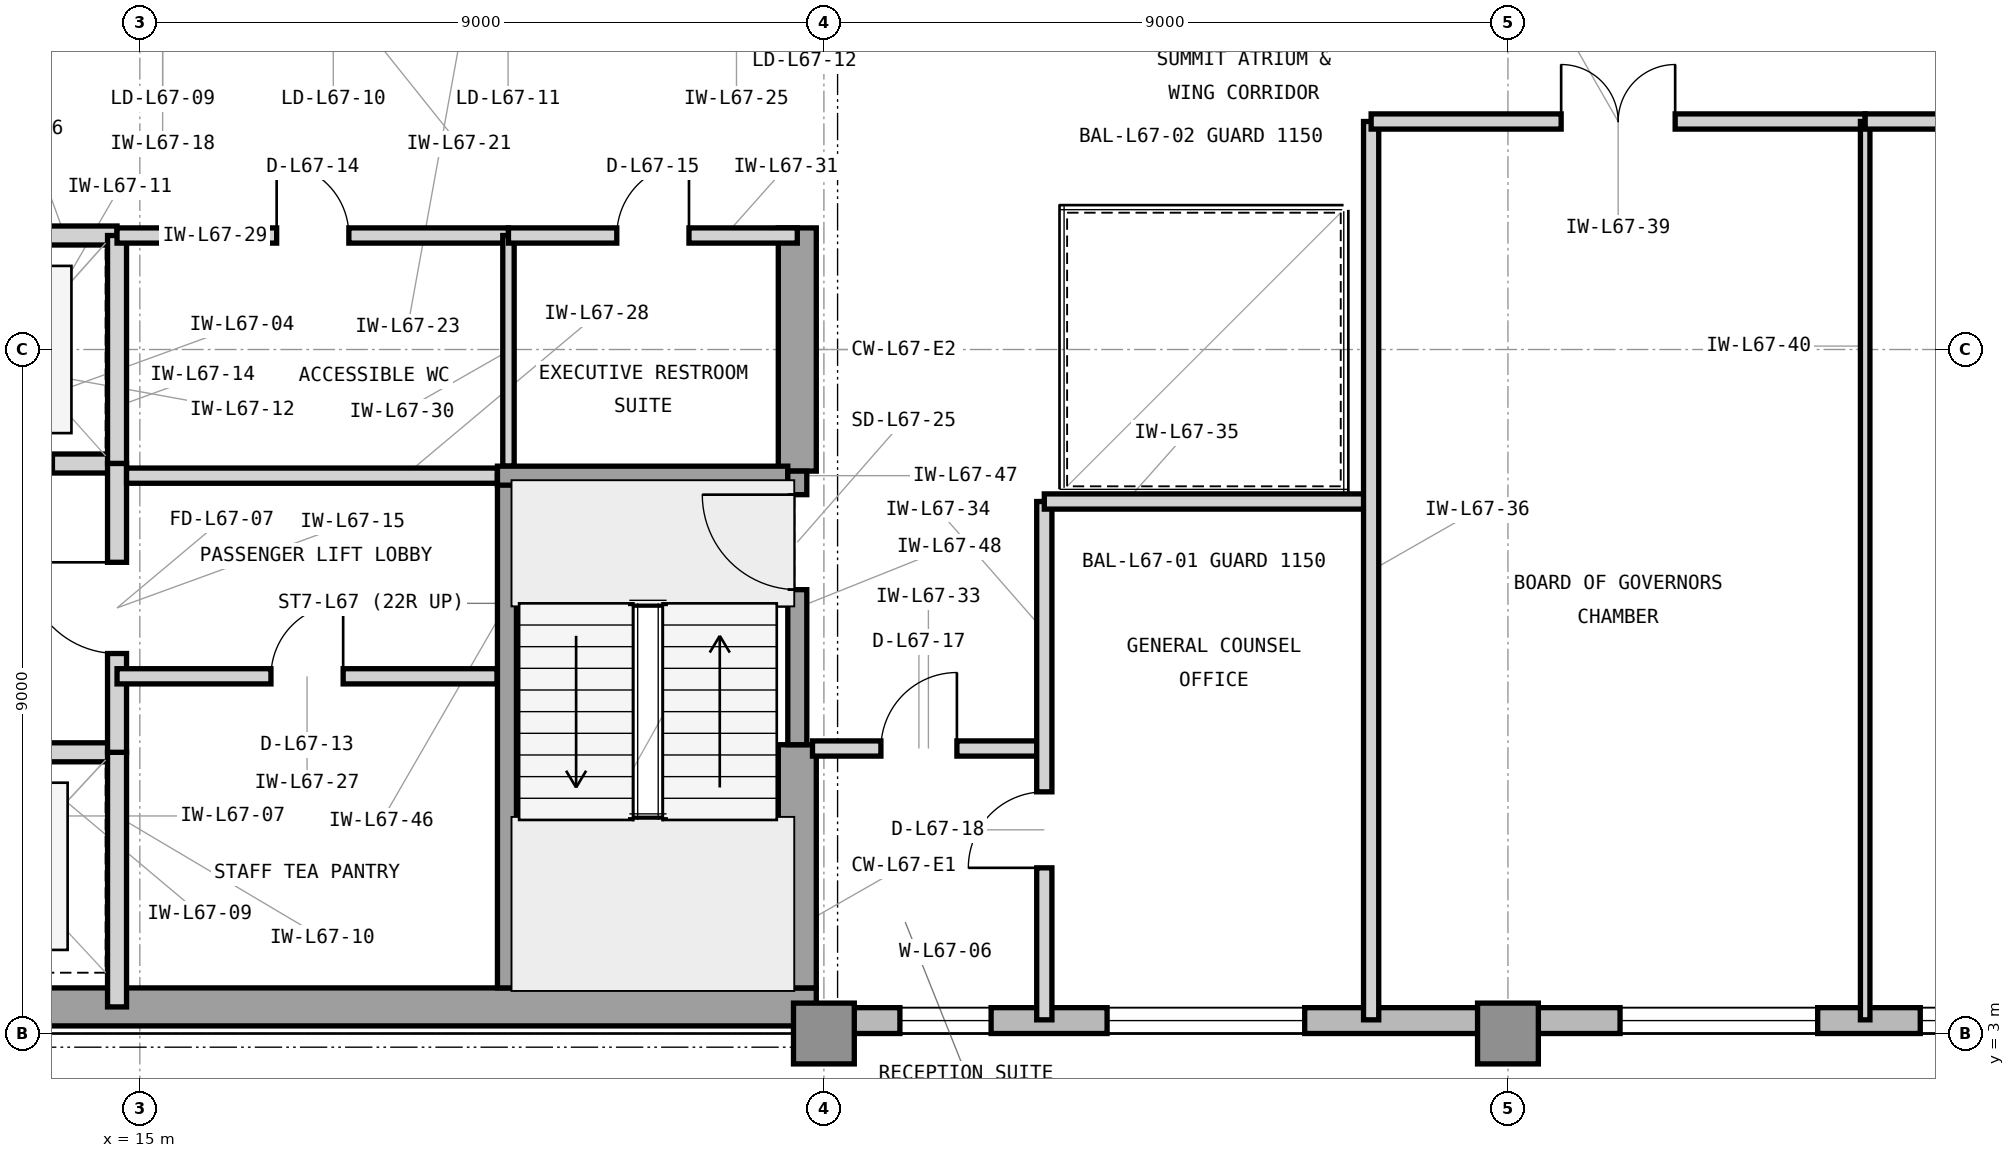
"""IFC4 building model, lengths in metres.
Left out: names, types, materials, properties, quantities, classifications, styles, units other than length and angle.
Written with IfcOpenShell. Run it as: python <this file> out.ifc"""

import sys

from ifc_helpers import new_model, si_unit, direction, frame, frame_2d, origin, origin_2d, place, context, subcontext, project, spatial, rectangle, extrude, element, fill, save


model = new_model("IFC4")
c1 = context("Model", 3, precision=1e-05, world=origin(), true_north=direction((0.0, 1.0)))
c2 = subcontext(c1, "Body", "Model", "MODEL_VIEW")
j1 = project(units=[si_unit("LENGTHUNIT", "METRE"), si_unit("PLANEANGLEUNIT", "RADIAN")], contexts=[c1])
p1 = place(None, origin())
s1 = spatial("IfcSite", under=j1, at=p1, CompositionType="ELEMENT")
p2 = place(p1, origin())
s2 = spatial("IfcBuilding", under=s1, at=p2, CompositionType="ELEMENT")
p3 = place(p2, frame((0.0, 0.0, 274.2)))
s3 = spatial("IfcBuildingStorey", under=s2, at=p3, CompositionType="ELEMENT", Elevation=274.2)
p4 = place(p3, frame((7.475, 3.35, 0.0), z_axis=(0.0, 0.0, 1.0), x_axis=(1.0, 0.0, 0.0)))
e1 = element("IfcWall", 1, at=p4, inside=s3, PredefinedType="SHEAR", context=c2, shape_type="SweptSolid", body=[
    extrude(rectangle(XDim=16.425, YDim=0.5, at=frame_2d((8.212, 0.0))), origin(), (0.0, 0.0, 1.0), 3.9),
])
p5 = place(p3, frame((23.65, 3.6, 0.0), z_axis=(0.0, 0.0, 1.0), x_axis=(0.0, 1.0, 0.0)))
e2 = element("IfcWall", 2, at=p5, inside=s3, PredefinedType="SHEAR", context=c2, shape_type="SweptSolid", body=[
    extrude(rectangle(XDim=3.2, YDim=0.5, at=frame_2d((1.6, 0.0))), origin(), (0.0, 0.0, 1.0), 3.9),
])
p6 = place(p3, frame((23.65, 10.4, 0.0), z_axis=(0.0, 0.0, 1.0), x_axis=(0.0, 1.0, 0.0)))
e3 = element("IfcWall", 3, at=p6, inside=s3, PredefinedType="SHEAR", context=c2, shape_type="SweptSolid", body=[
    extrude(rectangle(XDim=3.2, YDim=0.5, at=frame_2d((1.6, 0.0))), origin(), (0.0, 0.0, 1.0), 3.9),
])
for number, where, z_axis, x_axis in (
    (4, (24.0, 3.0, 0.0), (0.0, 0.0, 1.0), (1.0, 0.0, 0.0)),
    (5, (33.0, 3.0, 0.0), (0.0, 0.0, 1.0), (1.0, 0.0, 0.0)),
):
    element("IfcColumn", number, at=place(p3, frame(where, z_axis=z_axis, x_axis=x_axis)), inside=s3, PredefinedType="COLUMN", context=c2, shape_type="SweptSolid", body=[
        extrude(rectangle(XDim=0.8, YDim=0.8, at=origin_2d()), origin(), (0.0, 0.0, 1.0), 3.9),
    ])
p7 = place(p3, frame((23.9, 3.17, 0.0), z_axis=(0.0, 0.0, 1.0), x_axis=(1.0, 0.0, 0.0)))
e6 = element("IfcWall", 6, at=p7, inside=s3, PredefinedType="STANDARD", context=c2, shape_type="SweptSolid", body=[
    extrude(rectangle(XDim=28.5, YDim=0.34, at=frame_2d((14.25, 0.0))), origin(), (0.0, 0.0, 1.0), 3.715),
])
p8 = place(p7, frame((10.575, 0.0, 0.8)))
e7 = element("IfcOpeningElement", 7, at=p8, cuts=e6, PredefinedType="OPENING", context=c2, shape_type="SweptSolid", body=[
    extrude(rectangle(XDim=2.6, YDim=2.35, at=frame_2d((1.3, 1.175))), frame((0.0, 0.18, 0.0), z_axis=(0.0, -1.0, 0.0), x_axis=(1.0, 0.0, 0.0)), (0.0, 0.0, 1.0), 0.36),
])
p9 = place(p7, frame((1.1, 0.0, 0.8)))
e8 = element("IfcOpeningElement", 8, at=p9, cuts=e6, PredefinedType="OPENING", context=c2, shape_type="SweptSolid", body=[
    extrude(rectangle(XDim=1.2, YDim=2.35, at=frame_2d((0.6, 1.175))), frame((0.0, 0.18, 0.0), z_axis=(0.0, -1.0, 0.0), x_axis=(1.0, 0.0, 0.0)), (0.0, 0.0, 1.0), 0.36),
])
p10 = place(p7, frame((3.826, 0.0, 0.8)))
e9 = element("IfcOpeningElement", 9, at=p10, cuts=e6, PredefinedType="OPENING", context=c2, shape_type="SweptSolid", body=[
    extrude(rectangle(XDim=2.6, YDim=2.35, at=frame_2d((1.3, 1.175))), frame((0.0, 0.18, 0.0), z_axis=(0.0, -1.0, 0.0), x_axis=(1.0, 0.0, 0.0)), (0.0, 0.0, 1.0), 0.36),
])
p11 = place(p7, frame((14.525, 0.0, 0.8)))
e10 = element("IfcOpeningElement", 10, at=p11, cuts=e6, PredefinedType="OPENING", context=c2, shape_type="SweptSolid", body=[
    extrude(rectangle(XDim=2.6, YDim=2.35, at=frame_2d((1.3, 1.175))), frame((0.0, 0.18, 0.0), z_axis=(0.0, -1.0, 0.0), x_axis=(1.0, 0.0, 0.0)), (0.0, 0.0, 1.0), 0.36),
])
p12 = place(p3, frame((11.82, 6.7, 0.0), z_axis=(0.0, 0.0, 1.0), x_axis=(1.0, 0.0, 0.0)))
e11 = element("IfcWall", 11, at=p12, inside=s3, PredefinedType="PARTITIONING", context=c2, shape_type="SweptSolid", body=[
    extrude(rectangle(XDim=2.88, YDim=0.25, at=frame_2d((1.44, 0.0))), origin(), (0.0, 0.0, 1.0), 3.088),
])
p13 = place(p12, frame((0.85, 0.0, 0.0)))
e12 = element("IfcOpeningElement", 12, at=p13, cuts=e11, PredefinedType="OPENING", context=c2, shape_type="SweptSolid", body=[
    extrude(rectangle(XDim=1.1, YDim=2.25, at=frame_2d((0.55, 1.125))), frame((0.0, 0.135, 0.0), z_axis=(0.0, -1.0, 0.0), x_axis=(1.0, 0.0, 0.0)), (0.0, 0.0, 1.0), 0.27),
])
p14 = place(p3, frame((14.7, 3.35, 0.0), z_axis=(0.0, 0.0, 1.0), x_axis=(0.0, 1.0, 0.0)))
e13 = element("IfcWall", 13, at=p14, inside=s3, PredefinedType="PARTITIONING", context=c2, shape_type="SweptSolid", body=[
    extrude(rectangle(XDim=3.35, YDim=0.25, at=frame_2d((1.675, 0.0))), origin(), (0.0, 0.0, 1.0), 3.705),
])
p15 = place(p3, frame((11.95, 10.5, 0.0), z_axis=(0.0, 0.0, 1.0), x_axis=(1.0, 0.0, 0.0)))
e14 = element("IfcWall", 14, at=p15, inside=s3, PredefinedType="PARTITIONING", context=c2, shape_type="SweptSolid", body=[
    extrude(rectangle(XDim=2.75, YDim=0.25, at=frame_2d((1.375, 0.0))), origin(), (0.0, 0.0, 1.0), 3.088),
])
p16 = place(p15, frame((0.8, 0.0, 0.0)))
e15 = element("IfcOpeningElement", 15, at=p16, cuts=e14, PredefinedType="OPENING", context=c2, shape_type="SweptSolid", body=[
    extrude(rectangle(XDim=1.1, YDim=2.25, at=frame_2d((0.55, 1.125))), frame((0.0, 0.135, 0.0), z_axis=(0.0, -1.0, 0.0), x_axis=(1.0, 0.0, 0.0)), (0.0, 0.0, 1.0), 0.27),
])
p17 = place(p3, frame((11.95, 13.5, 0.0), z_axis=(0.0, 0.0, 1.0), x_axis=(1.0, 0.0, 0.0)))
e16 = element("IfcWall", 16, at=p17, inside=s3, PredefinedType="PARTITIONING", context=c2, shape_type="SweptSolid", body=[
    extrude(rectangle(XDim=2.75, YDim=0.25, at=frame_2d((1.375, 0.0))), origin(), (0.0, 0.0, 1.0), 3.088),
])
p18 = place(p3, frame((14.7, 10.5, 0.0), z_axis=(0.0, 0.0, 1.0), x_axis=(0.0, 1.0, 0.0)))
e17 = element("IfcWall", 17, at=p18, inside=s3, PredefinedType="PARTITIONING", context=c2, shape_type="SweptSolid", body=[
    extrude(rectangle(XDim=3.0, YDim=0.25, at=frame_2d((1.5, 0.0))), origin(), (0.0, 0.0, 1.0), 3.705),
])
p19 = place(p3, frame((14.7, 6.7, 0.0), z_axis=(0.0, 0.0, 1.0), x_axis=(0.0, 1.0, 0.0)))
e18 = element("IfcWall", 18, at=p19, inside=s3, PredefinedType="PARTITIONING", context=c2, shape_type="SweptSolid", body=[
    extrude(rectangle(XDim=3.8, YDim=0.25, at=frame_2d((1.9, 0.0))), origin(), (0.0, 0.0, 1.0), 3.705),
])
p20 = place(p19, frame((1.3, 0.0, 0.0)))
e19 = element("IfcOpeningElement", 19, at=p20, cuts=e18, PredefinedType="OPENING", context=c2, shape_type="SweptSolid", body=[
    extrude(rectangle(XDim=1.2, YDim=2.2, at=frame_2d((0.6, 1.1))), frame((0.0, 0.135, 0.0), z_axis=(0.0, -1.0, 0.0), x_axis=(1.0, 0.0, 0.0)), (0.0, 0.0, 1.0), 0.27),
])
p21 = place(p3, frame((14.7, 7.7, 0.0), z_axis=(0.0, 0.0, 1.0), x_axis=(1.0, 0.0, 0.0)))
e20 = element("IfcWall", 20, at=p21, inside=s3, PredefinedType="PARTITIONING", context=c2, shape_type="SweptSolid", body=[
    extrude(rectangle(XDim=5.0, YDim=0.2, at=frame_2d((2.5, 0.0))), origin(), (0.0, 0.0, 1.0), 3.705),
])
p22 = place(p21, frame((2.025, 0.0, 0.0)))
e21 = element("IfcOpeningElement", 21, at=p22, cuts=e20, PredefinedType="OPENING", context=c2, shape_type="SweptSolid", body=[
    extrude(rectangle(XDim=0.95, YDim=2.1, at=frame_2d((0.475, 1.05))), frame((0.0, 0.11, 0.0), z_axis=(0.0, -1.0, 0.0), x_axis=(1.0, 0.0, 0.0)), (0.0, 0.0, 1.0), 0.22),
])
p23 = place(p3, frame((14.825, 10.34, 0.0), z_axis=(0.0, 0.0, 1.0), x_axis=(1.0, 0.0, 0.0)))
e22 = element("IfcWall", 22, at=p23, inside=s3, PredefinedType="PARTITIONING", context=c2, shape_type="SweptSolid", body=[
    extrude(rectangle(XDim=4.88, YDim=0.2, at=frame_2d((2.44, 0.0))), origin(), (0.0, 0.0, 1.0), 3.088),
])
p24 = place(p3, frame((14.7, 13.5, 0.0), z_axis=(0.0, 0.0, 1.0), x_axis=(1.0, 0.0, 0.0)))
e23 = element("IfcWall", 23, at=p24, inside=s3, PredefinedType="PARTITIONING", context=c2, shape_type="SweptSolid", body=[
    extrude(rectangle(XDim=5.15, YDim=0.2, at=frame_2d((2.575, 0.0))), origin(), (0.0, 0.0, 1.0), 3.088),
])
p25 = place(p24, frame((2.1, 0.0, 0.0)))
e24 = element("IfcOpeningElement", 24, at=p25, cuts=e23, PredefinedType="OPENING", context=c2, shape_type="SweptSolid", body=[
    extrude(rectangle(XDim=0.95, YDim=2.1, at=frame_2d((0.475, 1.05))), frame((0.0, 0.11, 0.0), z_axis=(0.0, -1.0, 0.0), x_axis=(1.0, 0.0, 0.0)), (0.0, 0.0, 1.0), 0.22),
])
p26 = place(p3, frame((19.85, 10.465, 0.0), z_axis=(0.0, 0.0, 1.0), x_axis=(0.0, 1.0, 0.0)))
e25 = element("IfcWall", 25, at=p26, inside=s3, PredefinedType="PARTITIONING", context=c2, shape_type="SweptSolid", body=[
    extrude(rectangle(XDim=3.035, YDim=0.15, at=frame_2d((1.518, 0.0))), origin(), (0.0, 0.0, 1.0), 3.705),
])
p27 = place(p3, frame((19.85, 13.5, 0.0), z_axis=(0.0, 0.0, 1.0), x_axis=(1.0, 0.0, 0.0)))
e26 = element("IfcWall", 26, at=p27, inside=s3, PredefinedType="PARTITIONING", context=c2, shape_type="SweptSolid", body=[
    extrude(rectangle(XDim=3.8, YDim=0.2, at=frame_2d((1.9, 0.0))), origin(), (0.0, 0.0, 1.0), 3.088),
])
p28 = place(p27, frame((1.425, 0.0, 0.0)))
e27 = element("IfcOpeningElement", 27, at=p28, cuts=e26, PredefinedType="OPENING", context=c2, shape_type="SweptSolid", body=[
    extrude(rectangle(XDim=0.95, YDim=2.1, at=frame_2d((0.475, 1.05))), frame((0.0, 0.11, 0.0), z_axis=(0.0, -1.0, 0.0), x_axis=(1.0, 0.0, 0.0)), (0.0, 0.0, 1.0), 0.22),
])
p29 = place(p3, frame((23.85, 6.75, 0.0), z_axis=(0.0, 0.0, 1.0), x_axis=(1.0, 0.0, 0.0)))
e28 = element("IfcWall", 28, at=p29, inside=s3, PredefinedType="PARTITIONING", context=c2, shape_type="SweptSolid", body=[
    extrude(rectangle(XDim=3.05, YDim=0.2, at=frame_2d((1.525, 0.0))), origin(), (0.0, 0.0, 1.0), 3.705),
])
p30 = place(p29, frame((0.9, 0.0, 0.0)))
e29 = element("IfcOpeningElement", 29, at=p30, cuts=e28, PredefinedType="OPENING", context=c2, shape_type="SweptSolid", body=[
    extrude(rectangle(XDim=1.0, YDim=2.15, at=frame_2d((0.5, 1.075))), frame((0.0, 0.11, 0.0), z_axis=(0.0, -1.0, 0.0), x_axis=(1.0, 0.0, 0.0)), (0.0, 0.0, 1.0), 0.22),
])
p31 = place(p3, frame((26.9, 3.18, 0.0), z_axis=(0.0, 0.0, 1.0), x_axis=(0.0, 1.0, 0.0)))
e30 = element("IfcWall", 30, at=p31, inside=s3, PredefinedType="PARTITIONING", context=c2, shape_type="SweptSolid", body=[
    extrude(rectangle(XDim=6.82, YDim=0.2, at=frame_2d((3.41, 0.0))), origin(), (0.0, 0.0, 1.0), 3.705),
])
p32 = place(p31, frame((2.0, 0.0, 0.0)))
e31 = element("IfcOpeningElement", 31, at=p32, cuts=e30, PredefinedType="OPENING", context=c2, shape_type="SweptSolid", body=[
    extrude(rectangle(XDim=1.0, YDim=2.15, at=frame_2d((0.5, 1.075))), frame((0.0, 0.11, 0.0), z_axis=(0.0, -1.0, 0.0), x_axis=(1.0, 0.0, 0.0)), (0.0, 0.0, 1.0), 0.22),
])
p33 = place(p3, frame((26.9, 10.0, 0.0), z_axis=(0.0, 0.0, 1.0), x_axis=(1.0, 0.0, 0.0)))
e32 = element("IfcWall", 32, at=p33, inside=s3, PredefinedType="PARTITIONING", context=c2, shape_type="SweptSolid", body=[
    extrude(rectangle(XDim=4.3, YDim=0.2, at=frame_2d((2.15, 0.0))), origin(), (0.0, 0.0, 1.0), 3.705),
])
p34 = place(p3, frame((31.2, 3.18, 0.0), z_axis=(0.0, 0.0, 1.0), x_axis=(0.0, 1.0, 0.0)))
e33 = element("IfcWall", 33, at=p34, inside=s3, PredefinedType="PARTITIONING", context=c2, shape_type="SweptSolid", body=[
    extrude(rectangle(XDim=11.82, YDim=0.2, at=frame_2d((5.91, 0.0))), origin(), (0.0, 0.0, 1.0), 3.705),
])
p35 = place(p3, frame((31.2, 15.0, 0.0), z_axis=(0.0, 0.0, 1.0), x_axis=(1.0, 0.0, 0.0)))
e34 = element("IfcWall", 34, at=p35, inside=s3, PredefinedType="PARTITIONING", context=c2, shape_type="SweptSolid", body=[
    extrude(rectangle(XDim=6.5, YDim=0.2, at=frame_2d((3.25, 0.0))), origin(), (0.0, 0.0, 1.0), 3.301),
])
p36 = place(p35, frame((2.5, 0.0, 0.0)))
e35 = element("IfcOpeningElement", 35, at=p36, cuts=e34, PredefinedType="OPENING", context=c2, shape_type="SweptSolid", body=[
    extrude(rectangle(XDim=1.5, YDim=2.3, at=frame_2d((0.75, 1.15))), frame((0.0, 0.11, 0.0), z_axis=(0.0, -1.0, 0.0), x_axis=(1.0, 0.0, 0.0)), (0.0, 0.0, 1.0), 0.22),
])
p37 = place(p3, frame((37.7, 3.18, 0.0), z_axis=(0.0, 0.0, 1.0), x_axis=(0.0, 1.0, 0.0)))
e36 = element("IfcWall", 36, at=p37, inside=s3, PredefinedType="PARTITIONING", context=c2, shape_type="SweptSolid", body=[
    extrude(rectangle(XDim=11.82, YDim=0.125, at=frame_2d((5.91, 0.0))), origin(), (0.0, 0.0, 1.0), 3.705),
])
p38 = place(p3, frame((37.7, 15.0, 0.0), z_axis=(0.0, 0.0, 1.0), x_axis=(1.0, 0.0, 0.0)))
e37 = element("IfcWall", 37, at=p38, inside=s3, PredefinedType="PARTITIONING", context=c2, shape_type="SweptSolid", body=[
    extrude(rectangle(XDim=7.8, YDim=0.2, at=frame_2d((3.9, 0.0))), origin(), (0.0, 0.0, 1.0), 3.301),
])
p39 = place(p38, frame((3.4, 0.0, 0.0)))
e38 = element("IfcOpeningElement", 38, at=p39, cuts=e37, PredefinedType="OPENING", context=c2, shape_type="SweptSolid", body=[
    extrude(rectangle(XDim=1.0, YDim=2.15, at=frame_2d((0.5, 1.075))), frame((0.0, 0.11, 0.0), z_axis=(0.0, -1.0, 0.0), x_axis=(1.0, 0.0, 0.0)), (0.0, 0.0, 1.0), 0.22),
])
p40 = place(p3, frame((19.83, 3.6, 0.0), z_axis=(0.0, 0.0, 1.0), x_axis=(0.0, 1.0, 0.0)))
e39 = element("IfcWall", 39, at=p40, inside=s3, PredefinedType="SHEAR", context=c2, shape_type="SweptSolid", body=[
    extrude(rectangle(XDim=6.74, YDim=0.25, at=frame_2d((3.37, 0.0))), origin(), (0.0, 0.0, 1.0), 3.9),
])
p41 = place(p3, frame((19.705, 10.34, 0.0), z_axis=(0.0, 0.0, 1.0), x_axis=(1.0, 0.0, 0.0)))
e40 = element("IfcWall", 40, at=p41, inside=s3, PredefinedType="SHEAR", context=c2, shape_type="SweptSolid", body=[
    extrude(rectangle(XDim=3.82, YDim=0.25, at=frame_2d((1.91, 0.0))), origin(), (0.0, 0.0, 1.0), 3.9),
])
p42 = place(p3, frame((23.65, 6.8, 0.0), z_axis=(0.0, 0.0, 1.0), x_axis=(0.0, 1.0, 0.0)))
e41 = element("IfcWall", 41, at=p42, inside=s3, PredefinedType="SHEAR", context=c2, shape_type="SweptSolid", body=[
    extrude(rectangle(XDim=3.6, YDim=0.25, at=frame_2d((1.8, 0.0))), origin(), (0.0, 0.0, 1.0), 3.9),
])
p43 = place(p42, frame((2.04, 0.0, 0.0)))
e42 = element("IfcOpeningElement", 42, at=p43, cuts=e41, PredefinedType="OPENING", context=c2, shape_type="SweptSolid", body=[
    extrude(rectangle(XDim=1.25, YDim=2.2, at=frame_2d((0.625, 1.1))), frame((0.0, 0.135, 0.0), z_axis=(0.0, -1.0, 0.0), x_axis=(1.0, 0.0, 0.0)), (0.0, 0.0, 1.0), 0.27),
])
p44 = place(p8, origin())
e43 = element("IfcWindow", 43, at=p44, inside=s3, PartitioningType="SINGLE_PANEL", PredefinedType="WINDOW", context=c2, shape_type="SweptSolid", body=[
    extrude(rectangle(XDim=2.6, YDim=2.35, at=frame_2d((1.3, 1.175))), frame((0.0, 0.11, 0.0), z_axis=(0.0, -1.0, 0.0), x_axis=(1.0, 0.0, 0.0)), (0.0, 0.0, 1.0), 0.06),
])
fill(e7, e43)
p45 = place(p20, origin())
e44 = element("IfcDoor", 44, at=p45, inside=s3, OperationType="SINGLE_SWING_RIGHT", PredefinedType="DOOR", context=c2, shape_type="SweptSolid", body=[
    extrude(rectangle(XDim=1.2, YDim=2.2, at=frame_2d((0.6, 1.1))), frame((0.0, 0.025, 0.0), z_axis=(0.0, -1.0, 0.0), x_axis=(1.0, 0.0, 0.0)), (0.0, 0.0, 1.0), 0.05),
])
fill(e19, e44)
p46 = place(p22, origin())
e45 = element("IfcDoor", 45, at=p46, inside=s3, OperationType="SINGLE_SWING_RIGHT", PredefinedType="DOOR", context=c2, shape_type="SweptSolid", body=[
    extrude(rectangle(XDim=0.95, YDim=2.1, at=frame_2d((0.475, 1.05))), frame((0.0, 0.025, 0.0), z_axis=(0.0, -1.0, 0.0), x_axis=(1.0, 0.0, 0.0)), (0.0, 0.0, 1.0), 0.05),
])
fill(e21, e45)
p47 = place(p25, origin())
e46 = element("IfcDoor", 46, at=p47, inside=s3, OperationType="SINGLE_SWING_LEFT", PredefinedType="DOOR", context=c2, shape_type="SweptSolid", body=[
    extrude(rectangle(XDim=0.95, YDim=2.1, at=frame_2d((0.475, 1.05))), frame((0.0, 0.025, 0.0), z_axis=(0.0, -1.0, 0.0), x_axis=(1.0, 0.0, 0.0)), (0.0, 0.0, 1.0), 0.05),
])
fill(e24, e46)
p48 = place(p28, origin())
e47 = element("IfcDoor", 47, at=p48, inside=s3, OperationType="SINGLE_SWING_RIGHT", PredefinedType="DOOR", context=c2, shape_type="SweptSolid", body=[
    extrude(rectangle(XDim=0.95, YDim=2.1, at=frame_2d((0.475, 1.05))), frame((0.0, 0.025, 0.0), z_axis=(0.0, -1.0, 0.0), x_axis=(1.0, 0.0, 0.0)), (0.0, 0.0, 1.0), 0.05),
])
fill(e27, e47)
p49 = place(p30, origin())
e48 = element("IfcDoor", 48, at=p49, inside=s3, OperationType="SINGLE_SWING_RIGHT", PredefinedType="DOOR", context=c2, shape_type="SweptSolid", body=[
    extrude(rectangle(XDim=1.0, YDim=2.15, at=frame_2d((0.5, 1.075))), frame((0.0, 0.025, 0.0), z_axis=(0.0, -1.0, 0.0), x_axis=(1.0, 0.0, 0.0)), (0.0, 0.0, 1.0), 0.05),
])
fill(e29, e48)
p50 = place(p32, origin())
e49 = element("IfcDoor", 49, at=p50, inside=s3, OperationType="SINGLE_SWING_LEFT", PredefinedType="DOOR", context=c2, shape_type="SweptSolid", body=[
    extrude(rectangle(XDim=1.0, YDim=2.15, at=frame_2d((0.5, 1.075))), frame((0.0, 0.025, 0.0), z_axis=(0.0, -1.0, 0.0), x_axis=(1.0, 0.0, 0.0)), (0.0, 0.0, 1.0), 0.05),
])
fill(e31, e49)
p51 = place(p36, origin())
e50 = element("IfcDoor", 50, at=p51, inside=s3, OperationType="DOUBLE_DOOR_SINGLE_SWING", PredefinedType="DOOR", context=c2, shape_type="SweptSolid", body=[
    extrude(rectangle(XDim=1.5, YDim=2.3, at=frame_2d((0.75, 1.15))), frame((0.0, 0.025, 0.0), z_axis=(0.0, -1.0, 0.0), x_axis=(1.0, 0.0, 0.0)), (0.0, 0.0, 1.0), 0.05),
])
fill(e35, e50)
p52 = place(p43, origin())
e51 = element("IfcDoor", 51, at=p52, inside=s3, OperationType="SINGLE_SWING_RIGHT", PredefinedType="DOOR", context=c2, shape_type="SweptSolid", body=[
    extrude(rectangle(XDim=1.25, YDim=2.2, at=frame_2d((0.625, 1.1))), frame((0.0, 0.025, 0.0), z_axis=(0.0, -1.0, 0.0), x_axis=(1.0, 0.0, 0.0)), (0.0, 0.0, 1.0), 0.05),
])
fill(e42, e51)
p53 = place(p9, origin())
e52 = element("IfcWindow", 52, at=p53, inside=s3, PartitioningType="SINGLE_PANEL", PredefinedType="WINDOW", context=c2, shape_type="SweptSolid", body=[
    extrude(rectangle(XDim=1.2, YDim=2.35, at=frame_2d((0.6, 1.175))), frame((0.0, 0.11, 0.0), z_axis=(0.0, -1.0, 0.0), x_axis=(1.0, 0.0, 0.0)), (0.0, 0.0, 1.0), 0.06),
])
fill(e8, e52)
p54 = place(p10, origin())
e53 = element("IfcWindow", 53, at=p54, inside=s3, PartitioningType="SINGLE_PANEL", PredefinedType="WINDOW", context=c2, shape_type="SweptSolid", body=[
    extrude(rectangle(XDim=2.6, YDim=2.35, at=frame_2d((1.3, 1.175))), frame((0.0, 0.11, 0.0), z_axis=(0.0, -1.0, 0.0), x_axis=(1.0, 0.0, 0.0)), (0.0, 0.0, 1.0), 0.06),
])
fill(e9, e53)
p55 = place(p11, origin())
e54 = element("IfcWindow", 54, at=p55, inside=s3, PartitioningType="SINGLE_PANEL", PredefinedType="WINDOW", context=c2, shape_type="SweptSolid", body=[
    extrude(rectangle(XDim=2.6, YDim=2.35, at=frame_2d((1.3, 1.175))), frame((0.0, 0.11, 0.0), z_axis=(0.0, -1.0, 0.0), x_axis=(1.0, 0.0, 0.0)), (0.0, 0.0, 1.0), 0.06),
])
fill(e10, e54)
save(model, sys.argv[1])
